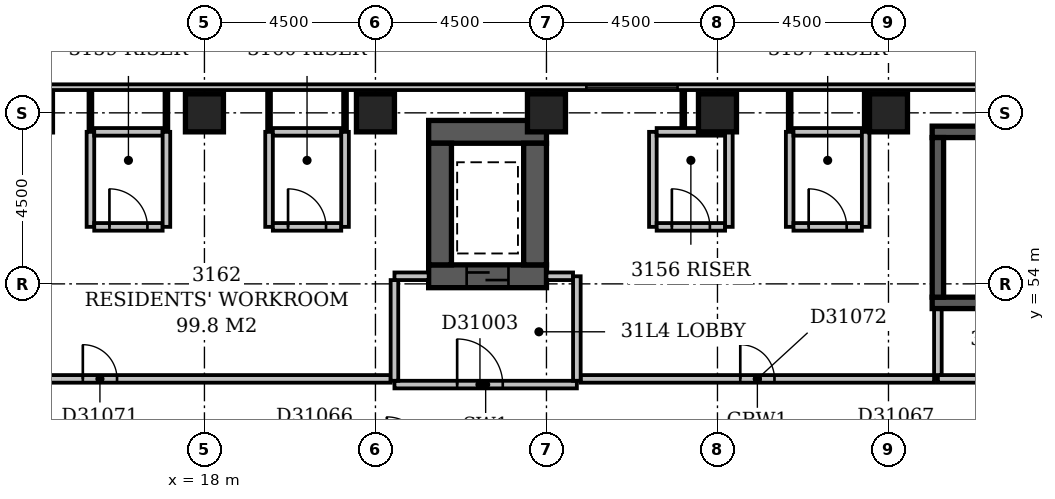
"""IFC4 building model, lengths in metres.
Left out: names, types, materials, properties, quantities, classifications, styles, units other than length and angle.
Written with IfcOpenShell. Run it as: python <this file> out.ifc"""

import sys

from ifc_helpers import new_model, si_unit, direction, frame, frame_2d, origin, origin_2d, place, context, subcontext, project, spatial, rectangle, extrude, element, fill, save


model = new_model("IFC4")
c1 = context("Model", 3, precision=1e-05, world=origin(), true_north=direction((0.0, 1.0)))
c2 = subcontext(c1, "Body", "Model", "MODEL_VIEW")
j1 = project(units=[si_unit("LENGTHUNIT", "METRE"), si_unit("PLANEANGLEUNIT", "RADIAN")], contexts=[c1])
p1 = place(None, origin())
s1 = spatial("IfcSite", under=j1, at=p1, CompositionType="ELEMENT")
p2 = place(p1, origin())
s2 = spatial("IfcBuilding", under=s1, at=p2, CompositionType="ELEMENT")
p3 = place(p2, frame((0.0, 0.0, 126.8)))
s3 = spatial("IfcBuildingStorey", under=s2, at=p3, CompositionType="ELEMENT", Elevation=126.8)
p4 = place(p3, frame((23.9, 54.2, -0.3), z_axis=(0.0, 0.0, 1.0), x_axis=(1.0, 0.0, 0.0)))
e1 = element("IfcWall", 1, at=p4, inside=s3, PredefinedType="SHEAR", context=c2, shape_type="SweptSolid", body=[
    extrude(rectangle(XDim=3.1, YDim=0.6, at=frame_2d((1.55, 0.0))), origin(), (0.0, 0.0, 1.0), 3.6),
])
p5 = place(p4, frame((1.0, 0.0, 0.3)))
e2 = element("IfcOpeningElement", 2, at=p5, cuts=e1, PredefinedType="OPENING", context=c2, shape_type="SweptSolid", body=[
    extrude(rectangle(XDim=1.1, YDim=2.1, at=frame_2d((0.55, 1.05))), frame((0.0, 0.312, 0.0), z_axis=(0.0, -1.0, 0.0), x_axis=(1.0, 0.0, 0.0)), (0.0, 0.0, 1.0), 0.624),
])
p6 = place(p3, frame((23.9, 58.0, -0.3), z_axis=(0.0, 0.0, 1.0), x_axis=(1.0, 0.0, 0.0)))
e3 = element("IfcWall", 3, at=p6, inside=s3, PredefinedType="SHEAR", context=c2, shape_type="SweptSolid", body=[
    extrude(rectangle(XDim=3.1, YDim=0.6, at=frame_2d((1.55, 0.0))), origin(), (0.0, 0.0, 1.0), 3.6),
])
for number, where, z_axis, x_axis in (
    (4, (24.2, 54.5, -0.3), (0.0, 0.0, 1.0), (0.0, 1.0, 0.0)),
    (5, (26.7, 54.5, -0.3), (0.0, 0.0, 1.0), (0.0, 1.0, 0.0)),
):
    element("IfcWall", number, at=place(p3, frame(where, z_axis=z_axis, x_axis=x_axis)), inside=s3, PredefinedType="SHEAR", context=c2, shape_type="SweptSolid", body=[
        extrude(rectangle(XDim=3.2, YDim=0.6, at=frame_2d((1.6, 0.0))), origin(), (0.0, 0.0, 1.0), 3.6),
    ])
p7 = place(p3, frame((37.15, 53.5, -0.3), z_axis=(0.0, 0.0, 1.0), x_axis=(1.0, 0.0, 0.0)))
e6 = element("IfcWall", 6, at=p7, inside=s3, PredefinedType="SHEAR", context=c2, shape_type="SweptSolid", body=[
    extrude(rectangle(XDim=7.0, YDim=0.3, at=frame_2d((3.5, 0.0))), origin(), (0.0, 0.0, 1.0), 3.6),
])
p8 = place(p7, frame((5.58, 0.0, 0.3)))
e7 = element("IfcOpeningElement", 7, at=p8, cuts=e6, PredefinedType="OPENING", context=c2, shape_type="SweptSolid", body=[
    extrude(rectangle(XDim=1.1, YDim=2.1, at=frame_2d((0.55, 1.05))), frame((0.0, 0.162, 0.0), z_axis=(0.0, -1.0, 0.0), x_axis=(1.0, 0.0, 0.0)), (0.0, 0.0, 1.0), 0.324),
])
p9 = place(p3, frame((37.15, 58.0, -0.3), z_axis=(0.0, 0.0, 1.0), x_axis=(1.0, 0.0, 0.0)))
e8 = element("IfcWall", 8, at=p9, inside=s3, PredefinedType="SHEAR", context=c2, shape_type="SweptSolid", body=[
    extrude(rectangle(XDim=7.35, YDim=0.3, at=frame_2d((3.675, 0.0))), origin(), (0.0, 0.0, 1.0), 3.6),
])
p10 = place(p3, frame((37.3, 53.65, -0.3), z_axis=(0.0, 0.0, 1.0), x_axis=(0.0, 1.0, 0.0)))
e9 = element("IfcWall", 9, at=p10, inside=s3, PredefinedType="SHEAR", context=c2, shape_type="SweptSolid", body=[
    extrude(rectangle(XDim=4.2, YDim=0.3, at=frame_2d((2.1, 0.0))), origin(), (0.0, 0.0, 1.0), 3.6),
])
for number, where, z_axis, x_axis in (
    (10, (18.0, 58.5, -0.3), (0.0, 0.0, 1.0), (1.0, 0.0, 0.0)),
    (11, (22.5, 58.5, -0.3), (0.0, 0.0, 1.0), (1.0, 0.0, 0.0)),
    (12, (27.0, 58.5, -0.3), (0.0, 0.0, 1.0), (1.0, 0.0, 0.0)),
    (13, (31.5, 58.5, -0.3), (0.0, 0.0, 1.0), (1.0, 0.0, 0.0)),
    (14, (36.0, 58.5, -0.3), (0.0, 0.0, 1.0), (1.0, 0.0, 0.0)),
):
    element("IfcColumn", number, at=place(p3, frame(where, z_axis=z_axis, x_axis=x_axis)), inside=s3, PredefinedType="COLUMN", context=c2, shape_type="SweptSolid", body=[
        extrude(rectangle(XDim=1.0, YDim=1.0, at=origin_2d()), origin(), (0.0, 0.0, 1.0), 3.6),
    ])
p11 = place(p3, frame((68.1, 59.175, 0.0), z_axis=(0.0, 0.0, 1.0), x_axis=(-1.0, 0.0, 0.0)))
e15 = element("IfcWall", 15, at=p11, inside=s3, PredefinedType="STANDARD", context=c2, shape_type="SweptSolid", body=[
    extrude(rectangle(XDim=68.85, YDim=0.15, at=frame_2d((34.425, 0.0))), origin(), (0.0, 0.0, 1.0), 2.7),
])
p12 = place(p11, frame((1.65, 0.0, 0.6)))
e16 = element("IfcOpeningElement", 16, at=p12, cuts=e15, PredefinedType="OPENING", context=c2, shape_type="SweptSolid", body=[
    extrude(rectangle(XDim=2.4, YDim=1.8, at=frame_2d((1.2, 0.9))), frame((0.0, 0.087, 0.0), z_axis=(0.0, -1.0, 0.0), x_axis=(1.0, 0.0, 0.0)), (0.0, 0.0, 1.0), 0.174),
])
p13 = place(p11, frame((5.854, 0.0, 0.6)))
e17 = element("IfcOpeningElement", 17, at=p13, cuts=e15, PredefinedType="OPENING", context=c2, shape_type="SweptSolid", body=[
    extrude(rectangle(XDim=1.5, YDim=1.8, at=frame_2d((0.75, 0.9))), frame((0.0, 0.087, 0.0), z_axis=(0.0, -1.0, 0.0), x_axis=(1.0, 0.0, 0.0)), (0.0, 0.0, 1.0), 0.174),
])
p14 = place(p11, frame((15.15, 0.0, 0.6)))
e18 = element("IfcOpeningElement", 18, at=p14, cuts=e15, PredefinedType="OPENING", context=c2, shape_type="SweptSolid", body=[
    extrude(rectangle(XDim=2.4, YDim=1.8, at=frame_2d((1.2, 0.9))), frame((0.0, 0.087, 0.0), z_axis=(0.0, -1.0, 0.0), x_axis=(1.0, 0.0, 0.0)), (0.0, 0.0, 1.0), 0.174),
])
p15 = place(p11, frame((20.847, 0.0, 0.6)))
e19 = element("IfcOpeningElement", 19, at=p15, cuts=e15, PredefinedType="OPENING", context=c2, shape_type="SweptSolid", body=[
    extrude(rectangle(XDim=1.5, YDim=1.8, at=frame_2d((0.75, 0.9))), frame((0.0, 0.087, 0.0), z_axis=(0.0, -1.0, 0.0), x_axis=(1.0, 0.0, 0.0)), (0.0, 0.0, 1.0), 0.174),
])
p16 = place(p11, frame((37.65, 0.0, 0.6)))
e20 = element("IfcOpeningElement", 20, at=p16, cuts=e15, PredefinedType="OPENING", context=c2, shape_type="SweptSolid", body=[
    extrude(rectangle(XDim=2.4, YDim=1.8, at=frame_2d((1.2, 0.9))), frame((0.0, 0.087, 0.0), z_axis=(0.0, -1.0, 0.0), x_axis=(1.0, 0.0, 0.0)), (0.0, 0.0, 1.0), 0.174),
])
p17 = place(p3, frame((23.0, 51.35, 0.0), z_axis=(0.0, 0.0, 1.0), x_axis=(1.0, 0.0, 0.0)))
e21 = element("IfcWall", 21, at=p17, inside=s3, PredefinedType="PARTITIONING", context=c2, shape_type="SweptSolid", body=[
    extrude(rectangle(XDim=4.8, YDim=0.2, at=frame_2d((2.4, 0.0))), origin(), (0.0, 0.0, 1.0), 3.3),
])
p18 = place(p17, frame((1.65, 0.0, 0.0)))
e22 = element("IfcOpeningElement", 22, at=p18, cuts=e21, PredefinedType="OPENING", context=c2, shape_type="SweptSolid", body=[
    extrude(rectangle(XDim=1.2, YDim=2.1, at=frame_2d((0.6, 1.05))), frame((0.0, 0.112, 0.0), z_axis=(0.0, -1.0, 0.0), x_axis=(1.0, 0.0, 0.0)), (0.0, 0.0, 1.0), 0.224),
])
p19 = place(p3, frame((27.8, 51.45, 0.0), z_axis=(0.0, 0.0, 1.0), x_axis=(0.0, 1.0, 0.0)))
e23 = element("IfcWall", 23, at=p19, inside=s3, PredefinedType="PARTITIONING", context=c2, shape_type="SweptSolid", body=[
    extrude(rectangle(XDim=2.75, YDim=0.2, at=frame_2d((1.375, 0.0))), origin(), (0.0, 0.0, 1.0), 3.3),
])
p20 = place(p3, frame((23.0, 54.2, 0.0), z_axis=(0.0, 0.0, 1.0), x_axis=(1.0, 0.0, 0.0)))
e24 = element("IfcWall", 24, at=p20, inside=s3, PredefinedType="PARTITIONING", context=c2, shape_type="SweptSolid", body=[
    extrude(rectangle(XDim=0.9, YDim=0.2, at=frame_2d((0.45, 0.0))), origin(), (0.0, 0.0, 1.0), 3.3),
])
p21 = place(p3, frame((27.0, 54.2, 0.0), z_axis=(0.0, 0.0, 1.0), x_axis=(1.0, 0.0, 0.0)))
e25 = element("IfcWall", 25, at=p21, inside=s3, PredefinedType="PARTITIONING", context=c2, shape_type="SweptSolid", body=[
    extrude(rectangle(XDim=0.7, YDim=0.2, at=frame_2d((0.35, 0.0))), origin(), (0.0, 0.0, 1.0), 3.3),
])
p22 = place(p3, frame((23.0, 51.45, 0.0), z_axis=(0.0, 0.0, 1.0), x_axis=(0.0, 1.0, 0.0)))
e26 = element("IfcWall", 26, at=p22, inside=s3, PredefinedType="PARTITIONING", context=c2, shape_type="SweptSolid", body=[
    extrude(rectangle(XDim=2.65, YDim=0.2, at=frame_2d((1.325, 0.0))), origin(), (0.0, 0.0, 1.0), 3.3),
])
p23 = place(p3, frame((37.3, 51.5, 0.0), z_axis=(0.0, 0.0, 1.0), x_axis=(1.0, 0.0, 0.0)))
e27 = element("IfcWall", 27, at=p23, inside=s3, PredefinedType="PARTITIONING", context=c2, shape_type="SweptSolid", body=[
    extrude(rectangle(XDim=6.7, YDim=0.2, at=frame_2d((3.35, 0.0))), origin(), (0.0, 0.0, 1.0), 3.3),
])
p24 = place(p23, frame((2.75, 0.0, 0.0)))
e28 = element("IfcOpeningElement", 28, at=p24, cuts=e27, PredefinedType="OPENING", context=c2, shape_type="SweptSolid", body=[
    extrude(rectangle(XDim=1.2, YDim=2.1, at=frame_2d((0.6, 1.05))), frame((0.0, 0.112, 0.0), z_axis=(0.0, -1.0, 0.0), x_axis=(1.0, 0.0, 0.0)), (0.0, 0.0, 1.0), 0.224),
])
p25 = place(p3, frame((37.3, 51.6, 0.0), z_axis=(0.0, 0.0, 1.0), x_axis=(0.0, 1.0, 0.0)))
e29 = element("IfcWall", 29, at=p25, inside=s3, PredefinedType="PARTITIONING", context=c2, shape_type="SweptSolid", body=[
    extrude(rectangle(XDim=1.73, YDim=0.2, at=frame_2d((0.865, 0.0))), origin(), (0.0, 0.0, 1.0), 3.3),
])
p26 = place(p3, frame((7.6, 51.5, 0.0), z_axis=(0.0, 0.0, 1.0), x_axis=(1.0, 0.0, 0.0)))
e30 = element("IfcWall", 30, at=p26, inside=s3, PredefinedType="PARTITIONING", context=c2, shape_type="SweptSolid", body=[
    extrude(rectangle(XDim=15.3, YDim=0.2, at=frame_2d((7.65, 0.0))), origin(), (0.0, 0.0, 1.0), 3.3),
])
p27 = place(p26, frame((7.2, 0.0, 0.0)))
e31 = element("IfcOpeningElement", 31, at=p27, cuts=e30, PredefinedType="OPENING", context=c2, shape_type="SweptSolid", body=[
    extrude(rectangle(XDim=0.9, YDim=2.1, at=frame_2d((0.45, 1.05))), frame((0.0, 0.112, 0.0), z_axis=(0.0, -1.0, 0.0), x_axis=(1.0, 0.0, 0.0)), (0.0, 0.0, 1.0), 0.224),
])
p28 = place(p3, frame((27.9, 51.5, 0.0), z_axis=(0.0, 0.0, 1.0), x_axis=(1.0, 0.0, 0.0)))
e32 = element("IfcWall", 32, at=p28, inside=s3, PredefinedType="PARTITIONING", context=c2, shape_type="SweptSolid", body=[
    extrude(rectangle(XDim=9.3, YDim=0.2, at=frame_2d((4.65, 0.0))), origin(), (0.0, 0.0, 1.0), 3.3),
])
p29 = place(p28, frame((4.2, 0.0, 0.0)))
e33 = element("IfcOpeningElement", 33, at=p29, cuts=e32, PredefinedType="OPENING", context=c2, shape_type="SweptSolid", body=[
    extrude(rectangle(XDim=0.9, YDim=2.1, at=frame_2d((0.45, 1.05))), frame((0.0, 0.112, 0.0), z_axis=(0.0, -1.0, 0.0), x_axis=(1.0, 0.0, 0.0)), (0.0, 0.0, 1.0), 0.224),
])
p30 = place(p3, frame((15.0, 55.5, 0.0), z_axis=(0.0, 0.0, 1.0), x_axis=(0.0, 1.0, 0.0)))
e34 = element("IfcWall", 34, at=p30, inside=s3, PredefinedType="PARTITIONING", context=c2, shape_type="SweptSolid", body=[
    extrude(rectangle(XDim=2.5, YDim=0.2, at=frame_2d((1.25, 0.0))), origin(), (0.0, 0.0, 1.0), 3.3),
])
p31 = place(p3, frame((15.1, 55.5, 0.0), z_axis=(0.0, 0.0, 1.0), x_axis=(1.0, 0.0, 0.0)))
e35 = element("IfcWall", 35, at=p31, inside=s3, PredefinedType="PARTITIONING", context=c2, shape_type="SweptSolid", body=[
    extrude(rectangle(XDim=1.8, YDim=0.2, at=frame_2d((0.9, 0.0))), origin(), (0.0, 0.0, 1.0), 3.3),
])
p32 = place(p31, frame((0.4, 0.0, 0.0)))
e36 = element("IfcOpeningElement", 36, at=p32, cuts=e35, PredefinedType="OPENING", context=c2, shape_type="SweptSolid", body=[
    extrude(rectangle(XDim=1.0, YDim=2.1, at=frame_2d((0.5, 1.05))), frame((0.0, 0.112, 0.0), z_axis=(0.0, -1.0, 0.0), x_axis=(1.0, 0.0, 0.0)), (0.0, 0.0, 1.0), 0.224),
])
for number, where, z_axis, x_axis in (
    (37, (17.0, 55.5, 0.0), (0.0, 0.0, 1.0), (0.0, 1.0, 0.0)),
    (38, (19.7, 55.5, 0.0), (0.0, 0.0, 1.0), (0.0, 1.0, 0.0)),
):
    element("IfcWall", number, at=place(p3, frame(where, z_axis=z_axis, x_axis=x_axis)), inside=s3, PredefinedType="PARTITIONING", context=c2, shape_type="SweptSolid", body=[
        extrude(rectangle(XDim=2.5, YDim=0.2, at=frame_2d((1.25, 0.0))), origin(), (0.0, 0.0, 1.0), 3.3),
    ])
p33 = place(p3, frame((19.8, 55.5, 0.0), z_axis=(0.0, 0.0, 1.0), x_axis=(1.0, 0.0, 0.0)))
e39 = element("IfcWall", 39, at=p33, inside=s3, PredefinedType="PARTITIONING", context=c2, shape_type="SweptSolid", body=[
    extrude(rectangle(XDim=1.8, YDim=0.2, at=frame_2d((0.9, 0.0))), origin(), (0.0, 0.0, 1.0), 3.3),
])
p34 = place(p33, frame((0.4, 0.0, 0.0)))
e40 = element("IfcOpeningElement", 40, at=p34, cuts=e39, PredefinedType="OPENING", context=c2, shape_type="SweptSolid", body=[
    extrude(rectangle(XDim=1.0, YDim=2.1, at=frame_2d((0.5, 1.05))), frame((0.0, 0.112, 0.0), z_axis=(0.0, -1.0, 0.0), x_axis=(1.0, 0.0, 0.0)), (0.0, 0.0, 1.0), 0.224),
])
for number, where, z_axis, x_axis in (
    (41, (21.7, 55.5, 0.0), (0.0, 0.0, 1.0), (0.0, 1.0, 0.0)),
    (42, (29.8, 55.5, 0.0), (0.0, 0.0, 1.0), (0.0, 1.0, 0.0)),
):
    element("IfcWall", number, at=place(p3, frame(where, z_axis=z_axis, x_axis=x_axis)), inside=s3, PredefinedType="PARTITIONING", context=c2, shape_type="SweptSolid", body=[
        extrude(rectangle(XDim=2.5, YDim=0.2, at=frame_2d((1.25, 0.0))), origin(), (0.0, 0.0, 1.0), 3.3),
    ])
p35 = place(p3, frame((29.9, 55.5, 0.0), z_axis=(0.0, 0.0, 1.0), x_axis=(1.0, 0.0, 0.0)))
e43 = element("IfcWall", 43, at=p35, inside=s3, PredefinedType="PARTITIONING", context=c2, shape_type="SweptSolid", body=[
    extrude(rectangle(XDim=1.8, YDim=0.2, at=frame_2d((0.9, 0.0))), origin(), (0.0, 0.0, 1.0), 3.3),
])
p36 = place(p35, frame((0.4, 0.0, 0.0)))
e44 = element("IfcOpeningElement", 44, at=p36, cuts=e43, PredefinedType="OPENING", context=c2, shape_type="SweptSolid", body=[
    extrude(rectangle(XDim=1.0, YDim=2.1, at=frame_2d((0.5, 1.05))), frame((0.0, 0.112, 0.0), z_axis=(0.0, -1.0, 0.0), x_axis=(1.0, 0.0, 0.0)), (0.0, 0.0, 1.0), 0.224),
])
for number, where, z_axis, x_axis in (
    (45, (31.8, 55.5, 0.0), (0.0, 0.0, 1.0), (0.0, 1.0, 0.0)),
    (46, (33.4, 55.5, 0.0), (0.0, 0.0, 1.0), (0.0, 1.0, 0.0)),
):
    element("IfcWall", number, at=place(p3, frame(where, z_axis=z_axis, x_axis=x_axis)), inside=s3, PredefinedType="PARTITIONING", context=c2, shape_type="SweptSolid", body=[
        extrude(rectangle(XDim=2.5, YDim=0.2, at=frame_2d((1.25, 0.0))), origin(), (0.0, 0.0, 1.0), 3.3),
    ])
p37 = place(p3, frame((33.5, 55.5, 0.0), z_axis=(0.0, 0.0, 1.0), x_axis=(1.0, 0.0, 0.0)))
e47 = element("IfcWall", 47, at=p37, inside=s3, PredefinedType="PARTITIONING", context=c2, shape_type="SweptSolid", body=[
    extrude(rectangle(XDim=1.8, YDim=0.2, at=frame_2d((0.9, 0.0))), origin(), (0.0, 0.0, 1.0), 3.3),
])
p38 = place(p37, frame((0.4, 0.0, 0.0)))
e48 = element("IfcOpeningElement", 48, at=p38, cuts=e47, PredefinedType="OPENING", context=c2, shape_type="SweptSolid", body=[
    extrude(rectangle(XDim=1.0, YDim=2.1, at=frame_2d((0.5, 1.05))), frame((0.0, 0.112, 0.0), z_axis=(0.0, -1.0, 0.0), x_axis=(1.0, 0.0, 0.0)), (0.0, 0.0, 1.0), 0.224),
])
p39 = place(p3, frame((35.4, 55.5, 0.0), z_axis=(0.0, 0.0, 1.0), x_axis=(0.0, 1.0, 0.0)))
e49 = element("IfcWall", 49, at=p39, inside=s3, PredefinedType="PARTITIONING", context=c2, shape_type="SweptSolid", body=[
    extrude(rectangle(XDim=2.5, YDim=0.2, at=frame_2d((1.25, 0.0))), origin(), (0.0, 0.0, 1.0), 2.4),
])
p40 = place(p3, frame((15.0, 58.0, 0.0), z_axis=(0.0, 0.0, 1.0), x_axis=(0.0, 1.0, 0.0)))
e50 = element("IfcWall", 50, at=p40, inside=s3, PredefinedType="PARTITIONING", context=c2, shape_type="SweptSolid", body=[
    extrude(rectangle(XDim=1.1, YDim=0.1, at=frame_2d((0.55, 0.0))), origin(), (0.0, 0.0, 1.0), 3.3),
])
p41 = place(p3, frame((15.1, 58.0, 0.0), z_axis=(0.0, 0.0, 1.0), x_axis=(1.0, 0.0, 0.0)))
e51 = element("IfcWall", 51, at=p41, inside=s3, PredefinedType="PARTITIONING", context=c2, shape_type="SweptSolid", body=[
    extrude(rectangle(XDim=1.8, YDim=0.2, at=frame_2d((0.9, 0.0))), origin(), (0.0, 0.0, 1.0), 3.3),
])
for number, where, z_axis, x_axis in (
    (52, (17.0, 58.0, 0.0), (0.0, 0.0, 1.0), (0.0, 1.0, 0.0)),
    (53, (19.7, 58.0, 0.0), (0.0, 0.0, 1.0), (0.0, 1.0, 0.0)),
):
    element("IfcWall", number, at=place(p3, frame(where, z_axis=z_axis, x_axis=x_axis)), inside=s3, PredefinedType="PARTITIONING", context=c2, shape_type="SweptSolid", body=[
        extrude(rectangle(XDim=1.1, YDim=0.1, at=frame_2d((0.55, 0.0))), origin(), (0.0, 0.0, 1.0), 3.3),
    ])
p42 = place(p3, frame((19.8, 58.0, 0.0), z_axis=(0.0, 0.0, 1.0), x_axis=(1.0, 0.0, 0.0)))
e54 = element("IfcWall", 54, at=p42, inside=s3, PredefinedType="PARTITIONING", context=c2, shape_type="SweptSolid", body=[
    extrude(rectangle(XDim=1.8, YDim=0.2, at=frame_2d((0.9, 0.0))), origin(), (0.0, 0.0, 1.0), 3.3),
])
p43 = place(p3, frame((21.7, 58.0, 0.0), z_axis=(0.0, 0.0, 1.0), x_axis=(0.0, 1.0, 0.0)))
e55 = element("IfcWall", 55, at=p43, inside=s3, PredefinedType="PARTITIONING", context=c2, shape_type="SweptSolid", body=[
    extrude(rectangle(XDim=1.1, YDim=0.1, at=frame_2d((0.55, 0.0))), origin(), (0.0, 0.0, 1.0), 3.3),
])
p44 = place(p3, frame((29.9, 58.0, 0.0), z_axis=(0.0, 0.0, 1.0), x_axis=(1.0, 0.0, 0.0)))
e56 = element("IfcWall", 56, at=p44, inside=s3, PredefinedType="PARTITIONING", context=c2, shape_type="SweptSolid", body=[
    extrude(rectangle(XDim=1.8, YDim=0.2, at=frame_2d((0.9, 0.0))), origin(), (0.0, 0.0, 1.0), 3.3),
])
p45 = place(p3, frame((33.4, 58.0, 0.0), z_axis=(0.0, 0.0, 1.0), x_axis=(0.0, 1.0, 0.0)))
e57 = element("IfcWall", 57, at=p45, inside=s3, PredefinedType="PARTITIONING", context=c2, shape_type="SweptSolid", body=[
    extrude(rectangle(XDim=1.1, YDim=0.1, at=frame_2d((0.55, 0.0))), origin(), (0.0, 0.0, 1.0), 3.3),
])
p46 = place(p3, frame((33.5, 58.0, 0.0), z_axis=(0.0, 0.0, 1.0), x_axis=(1.0, 0.0, 0.0)))
e58 = element("IfcWall", 58, at=p46, inside=s3, PredefinedType="PARTITIONING", context=c2, shape_type="SweptSolid", body=[
    extrude(rectangle(XDim=1.8, YDim=0.2, at=frame_2d((0.9, 0.0))), origin(), (0.0, 0.0, 1.0), 3.3),
])
p47 = place(p3, frame((35.4, 58.0, 0.0), z_axis=(0.0, 0.0, 1.0), x_axis=(0.0, 1.0, 0.0)))
e59 = element("IfcWall", 59, at=p47, inside=s3, PredefinedType="PARTITIONING", context=c2, shape_type="SweptSolid", body=[
    extrude(rectangle(XDim=1.1, YDim=0.1, at=frame_2d((0.55, 0.0))), origin(), (0.0, 0.0, 1.0), 2.4),
])
p48 = place(p3, frame((30.6, 58.1, 0.0), z_axis=(0.0, 0.0, 1.0), x_axis=(0.0, 1.0, 0.0)))
e60 = element("IfcWall", 60, at=p48, inside=s3, PredefinedType="PARTITIONING", context=c2, shape_type="SweptSolid", body=[
    extrude(rectangle(XDim=1.0, YDim=0.1, at=frame_2d((0.5, 0.0))), origin(), (0.0, 0.0, 1.0), 3.3),
])
p49 = place(p16, origin())
e61 = element("IfcWindow", 61, at=p49, inside=s3, PartitioningType="SINGLE_PANEL", PredefinedType="WINDOW", context=c2, shape_type="SweptSolid", body=[
    extrude(rectangle(XDim=2.4, YDim=1.8, at=frame_2d((1.2, 0.9))), frame((0.0, 0.03, 0.0), z_axis=(0.0, -1.0, 0.0), x_axis=(1.0, 0.0, 0.0)), (0.0, 0.0, 1.0), 0.06),
])
fill(e20, e61)
p50 = place(p18, origin())
e62 = element("IfcDoor", 62, at=p50, inside=s3, OperationType="SINGLE_SWING_LEFT", PredefinedType="DOOR", context=c2, shape_type="SweptSolid", body=[
    extrude(rectangle(XDim=1.2, YDim=2.1, at=frame_2d((0.6, 1.05))), frame((0.0, 0.025, 0.0), z_axis=(0.0, -1.0, 0.0), x_axis=(1.0, 0.0, 0.0)), (0.0, 0.0, 1.0), 0.05),
])
fill(e22, e62)
p51 = place(p5, origin())
e63 = element("IfcDoor", 63, at=p51, inside=s3, OperationType="SLIDING_TO_LEFT", PredefinedType="DOOR", context=c2, shape_type="SweptSolid", body=[
    extrude(rectangle(XDim=1.1, YDim=2.1, at=frame_2d((0.55, 1.05))), frame((0.0, 0.025, 0.0), z_axis=(0.0, -1.0, 0.0), x_axis=(1.0, 0.0, 0.0)), (0.0, 0.0, 1.0), 0.05),
])
fill(e2, e63)
p52 = place(p27, origin())
e64 = element("IfcDoor", 64, at=p52, inside=s3, OperationType="SINGLE_SWING_LEFT", PredefinedType="DOOR", context=c2, shape_type="SweptSolid", body=[
    extrude(rectangle(XDim=0.9, YDim=2.1, at=frame_2d((0.45, 1.05))), frame((0.0, 0.025, 0.0), z_axis=(0.0, -1.0, 0.0), x_axis=(1.0, 0.0, 0.0)), (0.0, 0.0, 1.0), 0.05),
])
fill(e31, e64)
p53 = place(p29, origin())
e65 = element("IfcDoor", 65, at=p53, inside=s3, OperationType="SINGLE_SWING_LEFT", PredefinedType="DOOR", context=c2, shape_type="SweptSolid", body=[
    extrude(rectangle(XDim=0.9, YDim=2.1, at=frame_2d((0.45, 1.05))), frame((0.0, 0.025, 0.0), z_axis=(0.0, -1.0, 0.0), x_axis=(1.0, 0.0, 0.0)), (0.0, 0.0, 1.0), 0.05),
])
fill(e33, e65)
p54 = place(p32, origin())
e66 = element("IfcDoor", 66, at=p54, inside=s3, OperationType="SINGLE_SWING_LEFT", PredefinedType="DOOR", context=c2, shape_type="SweptSolid", body=[
    extrude(rectangle(XDim=1.0, YDim=2.1, at=frame_2d((0.5, 1.05))), frame((0.0, 0.025, 0.0), z_axis=(0.0, -1.0, 0.0), x_axis=(1.0, 0.0, 0.0)), (0.0, 0.0, 1.0), 0.05),
])
fill(e36, e66)
p55 = place(p34, origin())
e67 = element("IfcDoor", 67, at=p55, inside=s3, OperationType="SINGLE_SWING_LEFT", PredefinedType="DOOR", context=c2, shape_type="SweptSolid", body=[
    extrude(rectangle(XDim=1.0, YDim=2.1, at=frame_2d((0.5, 1.05))), frame((0.0, 0.025, 0.0), z_axis=(0.0, -1.0, 0.0), x_axis=(1.0, 0.0, 0.0)), (0.0, 0.0, 1.0), 0.05),
])
fill(e40, e67)
p56 = place(p36, origin())
e68 = element("IfcDoor", 68, at=p56, inside=s3, OperationType="SINGLE_SWING_LEFT", PredefinedType="DOOR", context=c2, shape_type="SweptSolid", body=[
    extrude(rectangle(XDim=1.0, YDim=2.1, at=frame_2d((0.5, 1.05))), frame((0.0, 0.025, 0.0), z_axis=(0.0, -1.0, 0.0), x_axis=(1.0, 0.0, 0.0)), (0.0, 0.0, 1.0), 0.05),
])
fill(e44, e68)
p57 = place(p38, origin())
e69 = element("IfcDoor", 69, at=p57, inside=s3, OperationType="SINGLE_SWING_LEFT", PredefinedType="DOOR", context=c2, shape_type="SweptSolid", body=[
    extrude(rectangle(XDim=1.0, YDim=2.1, at=frame_2d((0.5, 1.05))), frame((0.0, 0.025, 0.0), z_axis=(0.0, -1.0, 0.0), x_axis=(1.0, 0.0, 0.0)), (0.0, 0.0, 1.0), 0.05),
])
fill(e48, e69)
save(model, sys.argv[1])
